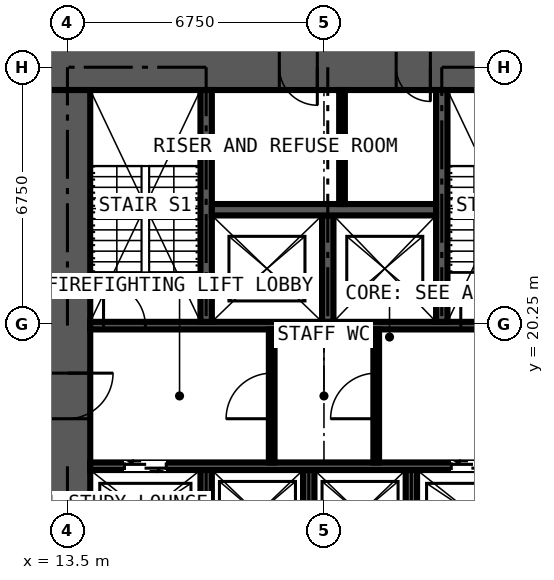
"""IFC4 building model, lengths in metres.
Left out: names, types, materials, properties, quantities, classifications, styles, units other than length and angle.
Written with IfcOpenShell. Run it as: python <this file> out.ifc"""

import sys

from ifc_helpers import new_model, si_unit, direction, frame, frame_2d, origin, place, context, subcontext, project, spatial, rectangle, extrude, element, fill, save


model = new_model("IFC4")
c1 = context("Model", 3, precision=1e-05, world=origin(), true_north=direction((0.0, 1.0)))
c2 = subcontext(c1, "Body", "Model", "MODEL_VIEW")
j1 = project(units=[si_unit("LENGTHUNIT", "METRE"), si_unit("PLANEANGLEUNIT", "RADIAN")], contexts=[c1])
p1 = place(None, origin())
s1 = spatial("IfcSite", under=j1, at=p1, CompositionType="ELEMENT")
p2 = place(p1, origin())
s2 = spatial("IfcBuilding", under=s1, at=p2, CompositionType="ELEMENT")
p3 = place(p2, frame((0.0, 0.0, 116.1)))
s3 = spatial("IfcBuildingStorey", under=s2, at=p3, CompositionType="ELEMENT", Elevation=116.1)
p4 = place(p3, frame((27.6, 27.0, 0.0), z_axis=(0.0, 0.0, 1.0), x_axis=(-1.0, 0.0, 0.0)))
e1 = element("IfcWall", 1, at=p4, inside=s3, PredefinedType="SHEAR", context=c2, shape_type="SweptSolid", body=[
    extrude(rectangle(XDim=14.7, YDim=1.2, at=frame_2d((7.35, 0.0))), origin(), (0.0, 0.0, 1.0), 3.6),
])
p5 = place(p4, frame((4.55, 0.0, 0.0)))
e2 = element("IfcOpeningElement", 2, at=p5, cuts=e1, PredefinedType="OPENING", context=c2, shape_type="SweptSolid", body=[
    extrude(rectangle(XDim=0.9, YDim=2.2, at=frame_2d((0.45, 1.1))), frame((0.0, 0.61, 0.0), z_axis=(0.0, -1.0, 0.0), x_axis=(1.0, 0.0, 0.0)), (0.0, 0.0, 1.0), 1.22),
])
p6 = place(p4, frame((7.525, 0.0, 0.0)))
e3 = element("IfcOpeningElement", 3, at=p6, cuts=e1, PredefinedType="OPENING", context=c2, shape_type="SweptSolid", body=[
    extrude(rectangle(XDim=1.0, YDim=2.2, at=frame_2d((0.5, 1.1))), frame((0.0, 0.61, 0.0), z_axis=(0.0, -1.0, 0.0), x_axis=(1.0, 0.0, 0.0)), (0.0, 0.0, 1.0), 1.22),
])
p7 = place(p3, frame((13.5, 26.4, 0.0), z_axis=(0.0, 0.0, 1.0), x_axis=(0.0, -1.0, 0.0)))
e4 = element("IfcWall", 4, at=p7, inside=s3, PredefinedType="SHEAR", context=c2, shape_type="SweptSolid", body=[
    extrude(rectangle(XDim=12.3, YDim=1.2, at=frame_2d((6.15, 0.0))), origin(), (0.0, 0.0, 1.0), 3.6),
])
p8 = place(p7, frame((7.45, 0.0, 0.0)))
e5 = element("IfcOpeningElement", 5, at=p8, cuts=e4, PredefinedType="OPENING", context=c2, shape_type="SweptSolid", body=[
    extrude(rectangle(XDim=1.2, YDim=2.2, at=frame_2d((0.6, 1.1))), frame((0.0, 0.61, 0.0), z_axis=(0.0, -1.0, 0.0), x_axis=(1.0, 0.0, 0.0)), (0.0, 0.0, 1.0), 1.22),
])
p9 = place(p3, frame((14.1, 16.5, 0.0), z_axis=(0.0, 0.0, 1.0), x_axis=(1.0, 0.0, 0.0)))
e6 = element("IfcWall", 6, at=p9, inside=s3, PredefinedType="SHEAR", context=c2, shape_type="SweptSolid", body=[
    extrude(rectangle(XDim=12.3, YDim=0.2, at=frame_2d((6.15, 0.0))), origin(), (0.0, 0.0, 1.0), 3.6),
])
p10 = place(p9, frame((0.9, 0.0, 0.0)))
e7 = element("IfcOpeningElement", 7, at=p10, cuts=e6, PredefinedType="OPENING", context=c2, shape_type="SweptSolid", body=[
    extrude(rectangle(XDim=1.1, YDim=2.2, at=frame_2d((0.55, 1.1))), frame((0.0, 0.11, 0.0), z_axis=(0.0, -1.0, 0.0), x_axis=(1.0, 0.0, 0.0)), (0.0, 0.0, 1.0), 0.22),
])
p11 = place(p9, frame((9.5, 0.0, 0.0)))
e8 = element("IfcOpeningElement", 8, at=p11, cuts=e6, PredefinedType="OPENING", context=c2, shape_type="SweptSolid", body=[
    extrude(rectangle(XDim=1.1, YDim=2.2, at=frame_2d((0.55, 1.1))), frame((0.0, 0.11, 0.0), z_axis=(0.0, -1.0, 0.0), x_axis=(1.0, 0.0, 0.0)), (0.0, 0.0, 1.0), 0.22),
])
p12 = place(p3, frame((14.1, 20.2, 0.0), z_axis=(0.0, 0.0, 1.0), x_axis=(1.0, 0.0, 0.0)))
e9 = element("IfcWall", 9, at=p12, inside=s3, PredefinedType="SHEAR", context=c2, shape_type="SweptSolid", body=[
    extrude(rectangle(XDim=12.3, YDim=0.2, at=frame_2d((6.15, 0.0))), origin(), (0.0, 0.0, 1.0), 3.6),
])
p13 = place(p12, frame((0.35, 0.0, 0.0)))
e10 = element("IfcOpeningElement", 10, at=p13, cuts=e9, PredefinedType="OPENING", context=c2, shape_type="SweptSolid", body=[
    extrude(rectangle(XDim=1.1, YDim=2.2, at=frame_2d((0.55, 1.1))), frame((0.0, 0.11, 0.0), z_axis=(0.0, -1.0, 0.0), x_axis=(1.0, 0.0, 0.0)), (0.0, 0.0, 1.0), 0.22),
])
p14 = place(p12, frame((9.75, 0.0, 0.0)))
e11 = element("IfcOpeningElement", 11, at=p14, cuts=e9, PredefinedType="OPENING", context=c2, shape_type="SweptSolid", body=[
    extrude(rectangle(XDim=1.1, YDim=2.2, at=frame_2d((0.55, 1.1))), frame((0.0, 0.11, 0.0), z_axis=(0.0, -1.0, 0.0), x_axis=(1.0, 0.0, 0.0)), (0.0, 0.0, 1.0), 0.22),
])
for number, where, z_axis, x_axis in (
    (12, (17.15, 20.3, 0.0), (0.0, 0.0, 1.0), (0.0, 1.0, 0.0)),
    (13, (23.35, 20.3, 0.0), (0.0, 0.0, 1.0), (0.0, 1.0, 0.0)),
):
    element("IfcWall", number, at=place(p3, frame(where, z_axis=z_axis, x_axis=x_axis)), inside=s3, PredefinedType="SHEAR", context=c2, shape_type="SweptSolid", body=[
        extrude(rectangle(XDim=6.1, YDim=0.3, at=frame_2d((3.05, 0.0))), origin(), (0.0, 0.0, 1.0), 3.6),
    ])
p15 = place(p3, frame((20.35, 20.3, 0.0), z_axis=(0.0, 0.0, 1.0), x_axis=(0.0, 1.0, 0.0)))
e14 = element("IfcWall", 14, at=p15, inside=s3, PredefinedType="SHEAR", context=c2, shape_type="SweptSolid", body=[
    extrude(rectangle(XDim=2.8, YDim=0.3, at=frame_2d((1.4, 0.0))), origin(), (0.0, 0.0, 1.0), 3.6),
])
p16 = place(p3, frame((17.3, 23.25, 0.0), z_axis=(0.0, 0.0, 1.0), x_axis=(1.0, 0.0, 0.0)))
e15 = element("IfcWall", 15, at=p16, inside=s3, PredefinedType="SHEAR", context=c2, shape_type="SweptSolid", body=[
    extrude(rectangle(XDim=5.9, YDim=0.3, at=frame_2d((2.95, 0.0))), origin(), (0.0, 0.0, 1.0), 3.6),
])
for number, where, z_axis, x_axis in (
    (16, (17.15, 14.1, 0.0), (0.0, 0.0, 1.0), (0.0, 1.0, 0.0)),
    (17, (19.85, 14.1, 0.0), (0.0, 0.0, 1.0), (0.0, 1.0, 0.0)),
    (18, (22.55, 14.1, 0.0), (0.0, 0.0, 1.0), (0.0, 1.0, 0.0)),
):
    element("IfcWall", number, at=place(p3, frame(where, z_axis=z_axis, x_axis=x_axis)), inside=s3, PredefinedType="SHEAR", context=c2, shape_type="SweptSolid", body=[
        extrude(rectangle(XDim=2.3, YDim=0.3, at=frame_2d((1.15, 0.0))), origin(), (0.0, 0.0, 1.0), 3.6),
    ])
p17 = place(p3, frame((18.875, 16.6, 0.0), z_axis=(0.0, 0.0, 1.0), x_axis=(0.0, 1.0, 0.0)))
e19 = element("IfcWall", 19, at=p17, inside=s3, PredefinedType="PARTITIONING", context=c2, shape_type="SweptSolid", body=[
    extrude(rectangle(XDim=3.5, YDim=0.15, at=frame_2d((1.75, 0.0))), origin(), (0.0, 0.0, 1.0), 3.375),
])
p18 = place(p17, frame((1.15, 0.0, 0.0)))
e20 = element("IfcOpeningElement", 20, at=p18, cuts=e19, PredefinedType="OPENING", context=c2, shape_type="SweptSolid", body=[
    extrude(rectangle(XDim=1.2, YDim=2.2, at=frame_2d((0.6, 1.1))), frame((0.0, 0.085, 0.0), z_axis=(0.0, -1.0, 0.0), x_axis=(1.0, 0.0, 0.0)), (0.0, 0.0, 1.0), 0.17),
])
p19 = place(p3, frame((21.625, 16.6, 0.0), z_axis=(0.0, 0.0, 1.0), x_axis=(0.0, 1.0, 0.0)))
e21 = element("IfcWall", 21, at=p19, inside=s3, PredefinedType="PARTITIONING", context=c2, shape_type="SweptSolid", body=[
    extrude(rectangle(XDim=3.5, YDim=0.15, at=frame_2d((1.75, 0.0))), origin(), (0.0, 0.0, 1.0), 3.375),
])
p20 = place(p19, frame((1.15, 0.0, 0.0)))
e22 = element("IfcOpeningElement", 22, at=p20, cuts=e21, PredefinedType="OPENING", context=c2, shape_type="SweptSolid", body=[
    extrude(rectangle(XDim=1.2, YDim=2.2, at=frame_2d((0.6, 1.1))), frame((0.0, 0.085, 0.0), z_axis=(0.0, -1.0, 0.0), x_axis=(1.0, 0.0, 0.0)), (0.0, 0.0, 1.0), 0.17),
])
p21 = place(p3, frame((20.725, 23.4, 0.0), z_axis=(0.0, 0.0, 1.0), x_axis=(0.0, 1.0, 0.0)))
e23 = element("IfcWall", 23, at=p21, inside=s3, PredefinedType="PARTITIONING", context=c2, shape_type="SweptSolid", body=[
    extrude(rectangle(XDim=3.0, YDim=0.15, at=frame_2d((1.5, 0.0))), origin(), (0.0, 0.0, 1.0), 3.375),
])
p22 = place(p10, origin())
e24 = element("IfcDoor", 24, at=p22, inside=s3, OperationType="DOUBLE_DOOR_SLIDING", PredefinedType="DOOR", context=c2, shape_type="SweptSolid", body=[
    extrude(rectangle(XDim=1.1, YDim=2.2, at=frame_2d((0.55, 1.1))), frame((0.0, 0.025, 0.0), z_axis=(0.0, -1.0, 0.0), x_axis=(1.0, 0.0, 0.0)), (0.0, 0.0, 1.0), 0.05),
])
fill(e7, e24)
p23 = place(p11, origin())
e25 = element("IfcDoor", 25, at=p23, inside=s3, OperationType="DOUBLE_DOOR_SLIDING", PredefinedType="DOOR", context=c2, shape_type="SweptSolid", body=[
    extrude(rectangle(XDim=1.1, YDim=2.2, at=frame_2d((0.55, 1.1))), frame((0.0, 0.025, 0.0), z_axis=(0.0, -1.0, 0.0), x_axis=(1.0, 0.0, 0.0)), (0.0, 0.0, 1.0), 0.05),
])
fill(e8, e25)
p24 = place(p8, origin())
e26 = element("IfcDoor", 26, at=p24, inside=s3, OperationType="DOUBLE_DOOR_SINGLE_SWING", PredefinedType="DOOR", context=c2, shape_type="SweptSolid", body=[
    extrude(rectangle(XDim=1.2, YDim=2.2, at=frame_2d((0.6, 1.1))), frame((0.0, 0.025, 0.0), z_axis=(0.0, -1.0, 0.0), x_axis=(1.0, 0.0, 0.0)), (0.0, 0.0, 1.0), 0.05),
])
fill(e5, e26)
p25 = place(p18, origin())
e27 = element("IfcDoor", 27, at=p25, inside=s3, OperationType="DOUBLE_DOOR_SINGLE_SWING", PredefinedType="DOOR", context=c2, shape_type="SweptSolid", body=[
    extrude(rectangle(XDim=1.2, YDim=2.2, at=frame_2d((0.6, 1.1))), frame((0.0, 0.025, 0.0), z_axis=(0.0, -1.0, 0.0), x_axis=(1.0, 0.0, 0.0)), (0.0, 0.0, 1.0), 0.05),
])
fill(e20, e27)
p26 = place(p20, origin())
e28 = element("IfcDoor", 28, at=p26, inside=s3, OperationType="DOUBLE_DOOR_SINGLE_SWING", PredefinedType="DOOR", context=c2, shape_type="SweptSolid", body=[
    extrude(rectangle(XDim=1.2, YDim=2.2, at=frame_2d((0.6, 1.1))), frame((0.0, 0.025, 0.0), z_axis=(0.0, -1.0, 0.0), x_axis=(1.0, 0.0, 0.0)), (0.0, 0.0, 1.0), 0.05),
])
fill(e22, e28)
p27 = place(p5, origin())
e29 = element("IfcDoor", 29, at=p27, inside=s3, OperationType="SINGLE_SWING_LEFT", PredefinedType="DOOR", context=c2, shape_type="SweptSolid", body=[
    extrude(rectangle(XDim=0.9, YDim=2.2, at=frame_2d((0.45, 1.1))), frame((0.0, 0.4, 0.0), z_axis=(0.0, -1.0, 0.0), x_axis=(1.0, 0.0, 0.0)), (0.0, 0.0, 1.0), 0.8),
])
fill(e2, e29)
p28 = place(p6, origin())
e30 = element("IfcDoor", 30, at=p28, inside=s3, OperationType="SINGLE_SWING_LEFT", PredefinedType="DOOR", context=c2, shape_type="SweptSolid", body=[
    extrude(rectangle(XDim=1.0, YDim=2.2, at=frame_2d((0.5, 1.1))), frame((0.0, 0.025, 0.0), z_axis=(0.0, -1.0, 0.0), x_axis=(1.0, 0.0, 0.0)), (0.0, 0.0, 1.0), 0.05),
])
fill(e3, e30)
p29 = place(p13, origin())
e31 = element("IfcDoor", 31, at=p29, inside=s3, OperationType="SINGLE_SWING_LEFT", PredefinedType="DOOR", context=c2, shape_type="SweptSolid", body=[
    extrude(rectangle(XDim=1.1, YDim=2.2, at=frame_2d((0.55, 1.1))), frame((0.0, 0.025, 0.0), z_axis=(0.0, -1.0, 0.0), x_axis=(1.0, 0.0, 0.0)), (0.0, 0.0, 1.0), 0.05),
])
fill(e10, e31)
p30 = place(p14, origin())
e32 = element("IfcDoor", 32, at=p30, inside=s3, OperationType="SINGLE_SWING_LEFT", PredefinedType="DOOR", context=c2, shape_type="SweptSolid", body=[
    extrude(rectangle(XDim=1.1, YDim=2.2, at=frame_2d((0.55, 1.1))), frame((0.0, 0.025, 0.0), z_axis=(0.0, -1.0, 0.0), x_axis=(1.0, 0.0, 0.0)), (0.0, 0.0, 1.0), 0.05),
])
fill(e11, e32)
save(model, sys.argv[1])
